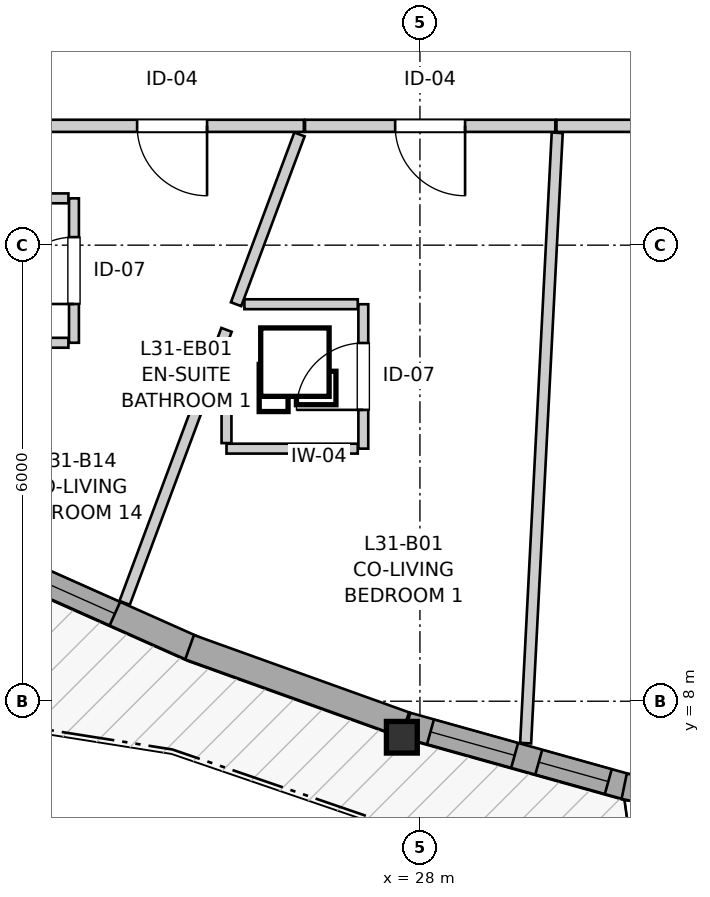
"""IFC4 building model, lengths in metres.
Left out: names, types, materials, properties, quantities, classifications, styles, units other than length and angle.
Written with IfcOpenShell. Run it as: python <this file> out.ifc"""

import sys

from ifc_helpers import new_model, si_unit, direction, frame, frame_2d, origin, origin_2d, place, context, subcontext, project, spatial, rectangle, i_section, extrude, source, transform, mapped, element, fill, save


model = new_model("IFC4")
c1 = context("Model", 3, precision=1e-05, world=origin(), true_north=direction((0.0, 1.0)))
c2 = subcontext(c1, "Body", "Model", "MODEL_VIEW")
j1 = project(units=[si_unit("LENGTHUNIT", "METRE"), si_unit("PLANEANGLEUNIT", "RADIAN")], contexts=[c1])
p1 = place(None, origin())
s1 = spatial("IfcSite", under=j1, at=p1, CompositionType="ELEMENT")
p2 = place(p1, origin())
s2 = spatial("IfcBuilding", under=s1, at=p2, CompositionType="ELEMENT")
p3 = place(p2, frame((0.0, 0.0, 105.6)))
s3 = spatial("IfcBuildingStorey", under=s2, at=p3, CompositionType="ELEMENT", Elevation=105.6)
m1 = source(origin(), c2, "Body", "SweptSolid", [
    extrude(i_section(OverallWidth=0.406, OverallDepth=0.416, WebThickness=0.027, FlangeThickness=0.044, FilletRadius=0.015, at=origin_2d()), origin(), (0.0, 0.0, 1.0), 2.935),
])
p4 = place(p3, frame((27.762, 7.526, 0.0), z_axis=(0.0, 0.0, 1.0), x_axis=(1.0, 0.0, 0.0)))
e1 = element("IfcColumn", 1, at=p4, inside=s3, PredefinedType="PILASTER", context=c2, shape_type="MappedRepresentation", body=[
    mapped(m1, transform((0.0, 0.0, 0.0), x_axis=(1.0, 0.0, 0.0), y_axis=(0.0, 1.0, 0.0), z_axis=(0.0, 0.0, 1.0), scale=1.0)),
])
p5 = place(p3, frame((22.525, 9.803, 0.0), z_axis=(0.0, 0.0, 1.0), x_axis=(0.913407022137, -0.407047432016, 0.0)))
e2 = element("IfcWall", 2, at=p5, inside=s3, PredefinedType="SOLIDWALL", context=c2, shape_type="SweptSolid", body=[
    extrude(rectangle(XDim=2.766, YDim=0.34, at=frame_2d((1.383, 0.0))), origin(), (0.0, 0.0, 1.0), 2.465),
])
p6 = place(p5, frame((0.45, 0.0, 0.82)))
e3 = element("IfcOpeningElement", 3, at=p6, cuts=e2, PredefinedType="OPENING", context=c2, shape_type="SweptSolid", body=[
    extrude(rectangle(XDim=1.15, YDim=1.2, at=frame_2d((0.575, 0.6))), frame((0.0, 0.18, 0.0), z_axis=(0.0, -1.0, 0.0), x_axis=(1.0, 0.0, 0.0)), (0.0, 0.0, 1.0), 0.36),
])
p7 = place(p3, frame((24.969, 8.71, 0.0), z_axis=(0.0, 0.0, 1.0), x_axis=(0.94111062187, -0.338098798287, 0.0)))
e4 = element("IfcWall", 4, at=p7, inside=s3, PredefinedType="SOLIDWALL", context=c2, shape_type="SweptSolid", body=[
    extrude(rectangle(XDim=3.009, YDim=0.34, at=frame_2d((1.504, 0.0))), origin(), (0.0, 0.0, 1.0), 2.465),
])
p8 = place(p3, frame((27.827, 7.684, 0.0), z_axis=(0.0, 0.0, 1.0), x_axis=(0.963051015651, -0.269319032475, 0.0)))
e5 = element("IfcWall", 5, at=p8, inside=s3, PredefinedType="SOLIDWALL", context=c2, shape_type="SweptSolid", body=[
    extrude(rectangle(XDim=3.059, YDim=0.34, at=frame_2d((1.529, 0.0))), origin(), (0.0, 0.0, 1.0), 2.465),
])
p9 = place(p8, frame((0.323, 0.0, 0.82)))
e6 = element("IfcOpeningElement", 6, at=p9, cuts=e5, PredefinedType="OPENING", context=c2, shape_type="SweptSolid", body=[
    extrude(rectangle(XDim=1.15, YDim=1.2, at=frame_2d((0.575, 0.6))), frame((0.0, 0.18, 0.0), z_axis=(0.0, -1.0, 0.0), x_axis=(1.0, 0.0, 0.0)), (0.0, 0.0, 1.0), 0.36),
])
p10 = place(p8, frame((1.803, 0.0, 0.82)))
e7 = element("IfcOpeningElement", 7, at=p10, cuts=e5, PredefinedType="OPENING", context=c2, shape_type="SweptSolid", body=[
    extrude(rectangle(XDim=0.95, YDim=1.35, at=frame_2d((0.475, 0.675))), frame((0.0, 0.18, 0.0), z_axis=(0.0, -1.0, 0.0), x_axis=(1.0, 0.0, 0.0)), (0.0, 0.0, 1.0), 0.36),
])
p11 = place(p3, frame((30.687, 6.881, 0.0), z_axis=(0.0, 0.0, 1.0), x_axis=(0.979429773913, -0.201785326453, 0.0)))
e8 = element("IfcWall", 8, at=p11, inside=s3, PredefinedType="SOLIDWALL", context=c2, shape_type="SweptSolid", body=[
    extrude(rectangle(XDim=2.913, YDim=0.34, at=frame_2d((1.457, 0.0))), origin(), (0.0, 0.0, 1.0), 2.465),
])
p12 = place(p11, frame((0.837, 0.0, 0.82)))
e9 = element("IfcOpeningElement", 9, at=p12, cuts=e8, PredefinedType="OPENING", context=c2, shape_type="SweptSolid", body=[
    extrude(rectangle(XDim=1.25, YDim=1.35, at=frame_2d((0.625, 0.675))), frame((0.0, 0.18, 0.0), z_axis=(0.0, -1.0, 0.0), x_axis=(1.0, 0.0, 0.0)), (0.0, 0.0, 1.0), 0.36),
])
p13 = place(p3, frame((34.373, 15.57, 0.0), z_axis=(0.0, 0.0, 1.0), x_axis=(-1.0, 0.0, 0.0)))
e10 = element("IfcWall", 10, at=p13, inside=s3, PredefinedType="PARTITIONING", context=c2, shape_type="SweptSolid", body=[
    extrude(rectangle(XDim=4.577, YDim=0.16, at=frame_2d((2.289, 0.0))), origin(), (0.0, 0.0, 1.0), 2.935),
])
p14 = place(p13, frame((1.639, 0.0, 0.0)))
e11 = element("IfcOpeningElement", 11, at=p14, cuts=e10, PredefinedType="OPENING", context=c2, shape_type="SweptSolid", body=[
    extrude(rectangle(XDim=1.3, YDim=2.1, at=frame_2d((0.65, 1.05))), frame((0.0, 0.09, 0.0), z_axis=(0.0, -1.0, 0.0), x_axis=(1.0, 0.0, 0.0)), (0.0, 0.0, 1.0), 0.18),
])
p15 = place(p3, frame((26.473, 15.57, 0.0), z_axis=(0.0, 0.0, 1.0), x_axis=(-1.0, 0.0, 0.0)))
e12 = element("IfcWall", 12, at=p15, inside=s3, PredefinedType="PARTITIONING", context=c2, shape_type="SweptSolid", body=[
    extrude(rectangle(XDim=3.47, YDim=0.16, at=frame_2d((1.735, 0.0))), origin(), (0.0, 0.0, 1.0), 2.935),
])
p16 = place(p15, frame((1.274, 0.0, 0.0)))
e13 = element("IfcOpeningElement", 13, at=p16, cuts=e12, PredefinedType="OPENING", context=c2, shape_type="SweptSolid", body=[
    extrude(rectangle(XDim=0.92, YDim=2.1, at=frame_2d((0.46, 1.05))), frame((0.0, 0.09, 0.0), z_axis=(0.0, -1.0, 0.0), x_axis=(1.0, 0.0, 0.0)), (0.0, 0.0, 1.0), 0.18),
])
p17 = place(p3, frame((29.781, 15.57, 0.0), z_axis=(0.0, 0.0, 1.0), x_axis=(-1.0, 0.0, 0.0)))
e14 = element("IfcWall", 14, at=p17, inside=s3, PredefinedType="PARTITIONING", context=c2, shape_type="SweptSolid", body=[
    extrude(rectangle(XDim=3.293, YDim=0.16, at=frame_2d((1.646, 0.0))), origin(), (0.0, 0.0, 1.0), 2.935),
])
p18 = place(p17, frame((1.187, 0.0, 0.0)))
e15 = element("IfcOpeningElement", 15, at=p18, cuts=e14, PredefinedType="OPENING", context=c2, shape_type="SweptSolid", body=[
    extrude(rectangle(XDim=0.92, YDim=2.1, at=frame_2d((0.46, 1.05))), frame((0.0, 0.09, 0.0), z_axis=(0.0, -1.0, 0.0), x_axis=(1.0, 0.0, 0.0)), (0.0, 0.0, 1.0), 0.18),
])
p19 = place(p3, frame((27.255, 11.323, 0.0), z_axis=(0.0, 0.0, 1.0), x_axis=(0.0, 1.0, 0.0)))
e16 = element("IfcWall", 16, at=p19, inside=s3, PredefinedType="PARTITIONING", context=c2, shape_type="SweptSolid", body=[
    extrude(rectangle(XDim=1.9, YDim=0.13, at=frame_2d((0.95, 0.0))), origin(), (0.0, 0.0, 1.0), 2.103),
])
p20 = place(p19, frame((0.51, 0.0, 0.0)))
e17 = element("IfcOpeningElement", 17, at=p20, cuts=e16, PredefinedType="OPENING", context=c2, shape_type="SweptSolid", body=[
    extrude(rectangle(XDim=0.88, YDim=2.05, at=frame_2d((0.44, 1.025))), frame((0.0, 0.075, 0.0), z_axis=(0.0, -1.0, 0.0), x_axis=(1.0, 0.0, 0.0)), (0.0, 0.0, 1.0), 0.15),
])
p21 = place(p3, frame((23.448, 12.716, 0.0), z_axis=(0.0, 0.0, 1.0), x_axis=(0.0, 1.0, 0.0)))
e18 = element("IfcWall", 18, at=p21, inside=s3, PredefinedType="PARTITIONING", context=c2, shape_type="SweptSolid", body=[
    extrude(rectangle(XDim=1.9, YDim=0.13, at=frame_2d((0.95, 0.0))), origin(), (0.0, 0.0, 1.0), 2.103),
])
p22 = place(p21, frame((0.51, 0.0, 0.0)))
e19 = element("IfcOpeningElement", 19, at=p22, cuts=e18, PredefinedType="OPENING", context=c2, shape_type="SweptSolid", body=[
    extrude(rectangle(XDim=0.88, YDim=2.05, at=frame_2d((0.44, 1.025))), frame((0.0, 0.075, 0.0), z_axis=(0.0, -1.0, 0.0), x_axis=(1.0, 0.0, 0.0)), (0.0, 0.0, 1.0), 0.15),
])
p23 = place(p3, frame((29.391, 7.448, 0.0), z_axis=(0.0, 0.0, 1.0), x_axis=(0.051677535725, 0.998663823467, 0.0)))
e20 = element("IfcWall", 20, at=p23, inside=s3, PredefinedType="PARTITIONING", context=c2, shape_type="SweptSolid", body=[
    extrude(rectangle(XDim=8.041, YDim=0.145, at=frame_2d((4.021, 0.0))), origin(), (0.0, 0.0, 1.0), 2.935),
])
p24 = place(p3, frame((24.115, 9.294, 0.0), z_axis=(0.0, 0.0, 1.0), x_axis=(0.349559649022, 0.936914111205, 0.0)))
e21 = element("IfcWall", 21, at=p24, inside=s3, PredefinedType="PARTITIONING", context=c2, shape_type="SweptSolid", body=[
    extrude(rectangle(XDim=3.834, YDim=0.145, at=frame_2d((1.917, 0.0))), origin(), (0.0, 0.0, 1.0), 2.935),
])
p25 = place(p3, frame((25.581, 13.223, 0.0), z_axis=(0.0, 0.0, 1.0), x_axis=(0.349597225683, 0.936900090615, 0.0)))
e22 = element("IfcWall", 22, at=p25, inside=s3, PredefinedType="PARTITIONING", context=c2, shape_type="SweptSolid", body=[
    extrude(rectangle(XDim=2.385, YDim=0.145, at=frame_2d((1.192, 0.0))), origin(), (0.0, 0.0, 1.0), 2.935),
])
p26 = place(p3, frame((25.455, 11.323, 0.0), z_axis=(0.0, 0.0, 1.0), x_axis=(1.0, 0.0, 0.0)))
e23 = element("IfcWall", 23, at=p26, inside=s3, PredefinedType="PARTITIONING", context=c2, shape_type="SweptSolid", body=[
    extrude(rectangle(XDim=1.727, YDim=0.13, at=frame_2d((0.863, 0.0))), origin(), (0.0, 0.0, 1.0), 2.543),
])
p27 = place(p3, frame((21.648, 12.716, 0.0), z_axis=(0.0, 0.0, 1.0), x_axis=(1.0, 0.0, 0.0)))
e24 = element("IfcWall", 24, at=p27, inside=s3, PredefinedType="PARTITIONING", context=c2, shape_type="SweptSolid", body=[
    extrude(rectangle(XDim=1.727, YDim=0.13, at=frame_2d((0.864, 0.0))), origin(), (0.0, 0.0, 1.0), 2.935),
])
p28 = place(p3, frame((25.691, 13.223, 0.0), z_axis=(0.0, 0.0, 1.0), x_axis=(1.0, 0.0, 0.0)))
e25 = element("IfcWall", 25, at=p28, inside=s3, PredefinedType="PARTITIONING", context=c2, shape_type="SweptSolid", body=[
    extrude(rectangle(XDim=1.491, YDim=0.13, at=frame_2d((0.746, 0.0))), origin(), (0.0, 0.0, 1.0), 2.935),
])
p29 = place(p3, frame((25.455, 11.396, 0.0), z_axis=(0.0, 0.0, 1.0), x_axis=(0.0, 1.0, 0.0)))
e26 = element("IfcWall", 26, at=p29, inside=s3, PredefinedType="PARTITIONING", context=c2, shape_type="SweptSolid", body=[
    extrude(rectangle(XDim=1.25, YDim=0.13, at=frame_2d((0.625, 0.0))), origin(), (0.0, 0.0, 1.0), 2.935),
])
p30 = place(p3, frame((22.493, 14.616, 0.0), z_axis=(0.0, 0.0, 1.0), x_axis=(1.0, 0.0, 0.0)))
e27 = element("IfcWall", 27, at=p30, inside=s3, PredefinedType="PARTITIONING", context=c2, shape_type="SweptSolid", body=[
    extrude(rectangle(XDim=0.882, YDim=0.13, at=frame_2d((0.441, 0.0))), origin(), (0.0, 0.0, 1.0), 2.935),
])
m2 = source(origin(), c2, "Body", "SweptSolid", [
    extrude(rectangle(XDim=1.15, YDim=1.2, at=frame_2d((0.575, 0.6))), frame((0.0, 0.03, 0.0), z_axis=(0.0, -1.0, 0.0), x_axis=(1.0, 0.0, 0.0)), (0.0, 0.0, 1.0), 0.06),
])
p31 = place(p6, origin())
e28 = element("IfcWindow", 28, at=p31, inside=s3, PartitioningType="SINGLE_PANEL", PredefinedType="WINDOW", context=c2, shape_type="MappedRepresentation", body=[
    mapped(m2, transform((0.0, 0.0, 0.0), x_axis=(1.0, 0.0, 0.0), y_axis=(0.0, 1.0, 0.0), z_axis=(0.0, 0.0, 1.0), scale=1.0)),
])
fill(e3, e28)
p32 = place(p9, origin())
e29 = element("IfcWindow", 29, at=p32, inside=s3, PartitioningType="SINGLE_PANEL", PredefinedType="WINDOW", context=c2, shape_type="MappedRepresentation", body=[
    mapped(m2, transform((0.0, 0.0, 0.0), x_axis=(1.0, 0.0, 0.0), y_axis=(0.0, 1.0, 0.0), z_axis=(0.0, 0.0, 1.0), scale=1.0)),
])
fill(e6, e29)
m3 = source(origin(), c2, "Body", "SweptSolid", [
    extrude(rectangle(XDim=0.95, YDim=1.35, at=frame_2d((0.475, 0.675))), frame((0.0, 0.03, 0.0), z_axis=(0.0, -1.0, 0.0), x_axis=(1.0, 0.0, 0.0)), (0.0, 0.0, 1.0), 0.06),
])
p33 = place(p10, origin())
e30 = element("IfcWindow", 30, at=p33, inside=s3, PartitioningType="SINGLE_PANEL", PredefinedType="WINDOW", context=c2, shape_type="MappedRepresentation", body=[
    mapped(m3, transform((0.0, 0.0, 0.0), x_axis=(1.0, 0.0, 0.0), y_axis=(0.0, 1.0, 0.0), z_axis=(0.0, 0.0, 1.0), scale=1.0)),
])
fill(e7, e30)
m4 = source(origin(), c2, "Body", "SweptSolid", [
    extrude(rectangle(XDim=0.92, YDim=2.1, at=frame_2d((0.46, 1.05))), frame((0.0, 0.025, 0.0), z_axis=(0.0, -1.0, 0.0), x_axis=(1.0, 0.0, 0.0)), (0.0, 0.0, 1.0), 0.05),
])
p34 = place(p16, origin())
e31 = element("IfcDoor", 31, at=p34, inside=s3, OperationType="SINGLE_SWING_LEFT", PredefinedType="DOOR", context=c2, shape_type="MappedRepresentation", body=[
    mapped(m4, transform((0.0, 0.0, 0.0), x_axis=(1.0, 0.0, 0.0), y_axis=(0.0, 1.0, 0.0), z_axis=(0.0, 0.0, 1.0), scale=1.0)),
])
fill(e13, e31)
p35 = place(p18, origin())
e32 = element("IfcDoor", 32, at=p35, inside=s3, OperationType="SINGLE_SWING_LEFT", PredefinedType="DOOR", context=c2, shape_type="MappedRepresentation", body=[
    mapped(m4, transform((0.0, 0.0, 0.0), x_axis=(1.0, 0.0, 0.0), y_axis=(0.0, 1.0, 0.0), z_axis=(0.0, 0.0, 1.0), scale=1.0)),
])
fill(e15, e32)
m5 = source(origin(), c2, "Body", "SweptSolid", [
    extrude(rectangle(XDim=0.88, YDim=2.05, at=frame_2d((0.44, 1.025))), frame((0.0, 0.025, 0.0), z_axis=(0.0, -1.0, 0.0), x_axis=(1.0, 0.0, 0.0)), (0.0, 0.0, 1.0), 0.05),
])
p36 = place(p20, origin())
e33 = element("IfcDoor", 33, at=p36, inside=s3, OperationType="SINGLE_SWING_LEFT", PredefinedType="DOOR", context=c2, shape_type="MappedRepresentation", body=[
    mapped(m5, transform((0.0, 0.0, 0.0), x_axis=(1.0, 0.0, 0.0), y_axis=(0.0, 1.0, 0.0), z_axis=(0.0, 0.0, 1.0), scale=1.0)),
])
fill(e17, e33)
p37 = place(p22, origin())
e34 = element("IfcDoor", 34, at=p37, inside=s3, OperationType="SINGLE_SWING_LEFT", PredefinedType="DOOR", context=c2, shape_type="MappedRepresentation", body=[
    mapped(m5, transform((0.0, 0.0, 0.0), x_axis=(1.0, 0.0, 0.0), y_axis=(0.0, 1.0, 0.0), z_axis=(0.0, 0.0, 1.0), scale=1.0)),
])
fill(e19, e34)
save(model, sys.argv[1])
